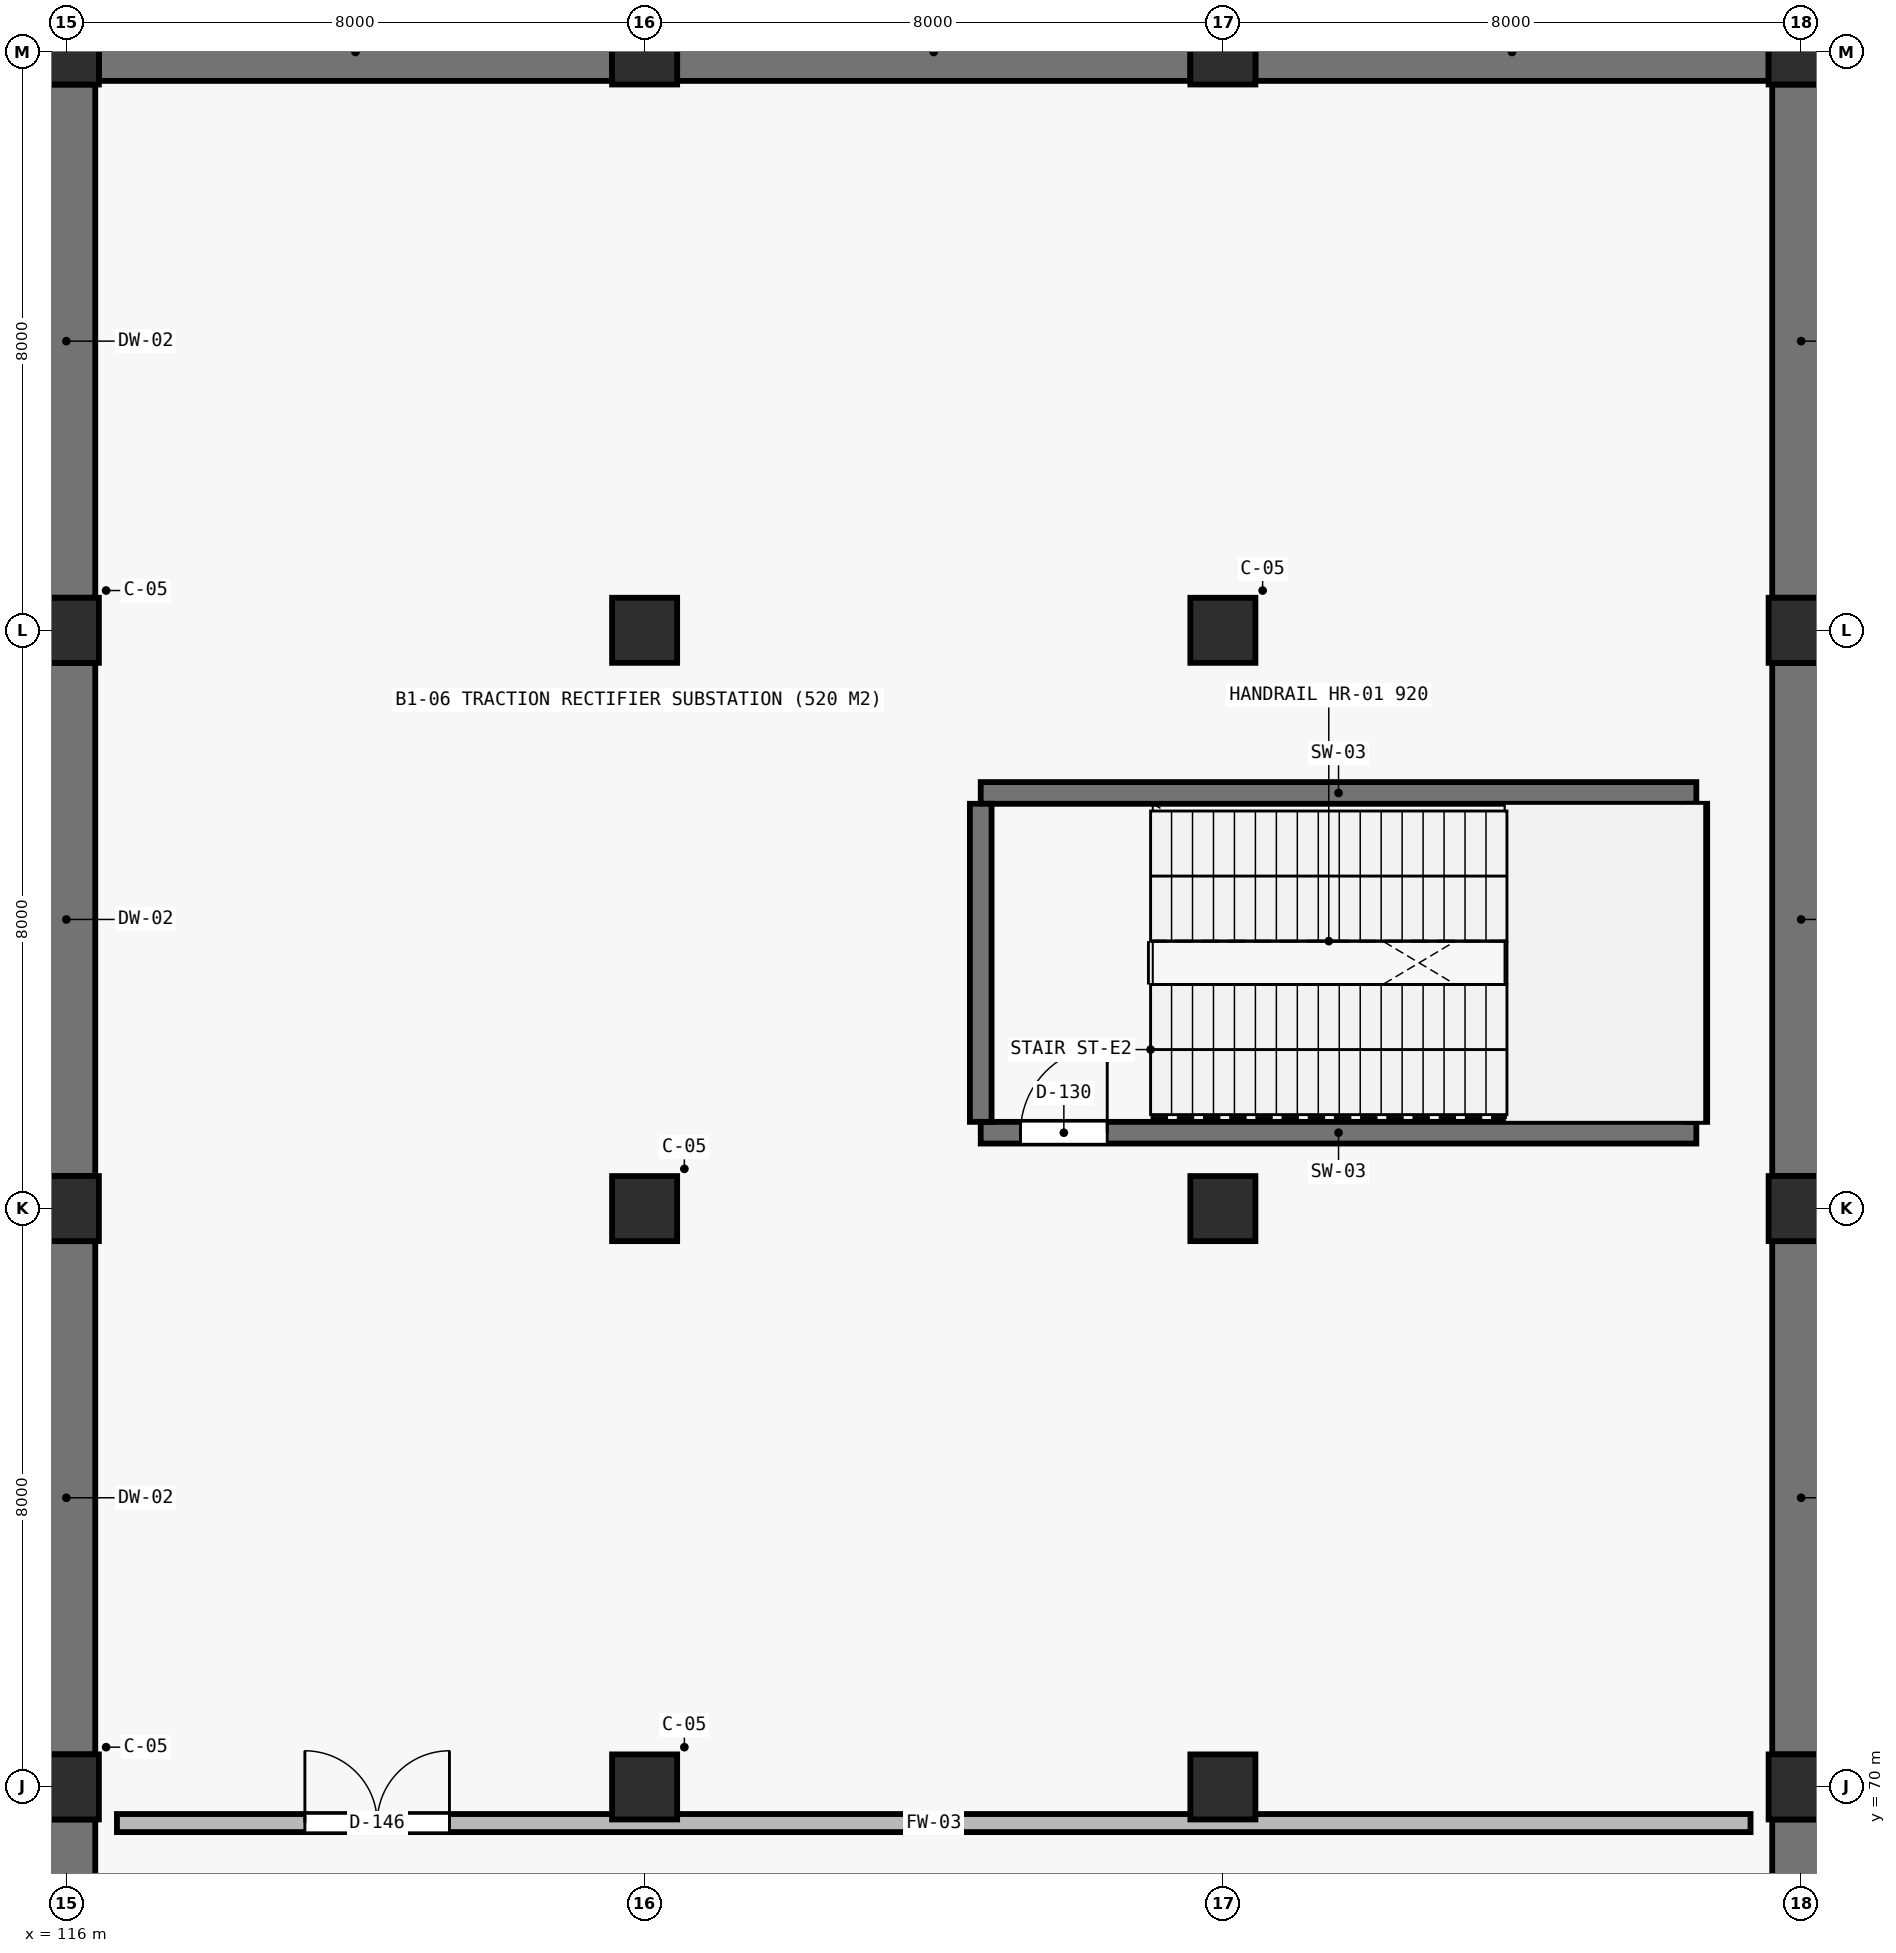
"""IFC4 building model, lengths in metres.
Left out: names, types, materials, properties, quantities, classifications, styles, units other than length and angle.
Written with IfcOpenShell. Run it as: python <this file> out.ifc"""

import sys

from ifc_helpers import new_model, si_unit, direction, frame, frame_2d, origin, origin_2d, place, context, subcontext, project, spatial, rectangle, extrude, element, fill, save


model = new_model("IFC4")
c1 = context("Model", 3, precision=1e-05, world=origin(), true_north=direction((0.0, 1.0)))
c2 = subcontext(c1, "Body", "Model", "MODEL_VIEW")
j1 = project(units=[si_unit("LENGTHUNIT", "METRE"), si_unit("PLANEANGLEUNIT", "RADIAN")], contexts=[c1])
p1 = place(None, origin())
s1 = spatial("IfcSite", under=j1, at=p1, CompositionType="ELEMENT")
p2 = place(p1, origin())
s2 = spatial("IfcBuilding", under=s1, at=p2, CompositionType="ELEMENT")
p3 = place(p2, frame((0.0, 0.0, -6.3)))
s3 = spatial("IfcBuildingStorey", under=s2, at=p3, CompositionType="ELEMENT", Elevation=-6.3)
for number, where, z_axis, x_axis in (
    (1, (116.0, 70.0, 0.0), (0.0, 0.0, 1.0), (1.0, 0.0, 0.0)),
    (2, (116.0, 78.0, 0.0), (0.0, 0.0, 1.0), (1.0, 0.0, 0.0)),
    (3, (116.0, 86.0, 0.0), (0.0, 0.0, 1.0), (1.0, 0.0, 0.0)),
    (4, (116.0, 94.0, 0.0), (0.0, 0.0, 1.0), (1.0, 0.0, 0.0)),
    (5, (124.0, 70.0, 0.0), (0.0, 0.0, 1.0), (1.0, 0.0, 0.0)),
    (6, (124.0, 78.0, 0.0), (0.0, 0.0, 1.0), (1.0, 0.0, 0.0)),
    (7, (124.0, 86.0, 0.0), (0.0, 0.0, 1.0), (1.0, 0.0, 0.0)),
    (8, (124.0, 94.0, 0.0), (0.0, 0.0, 1.0), (1.0, 0.0, 0.0)),
    (9, (132.0, 70.0, 0.0), (0.0, 0.0, 1.0), (1.0, 0.0, 0.0)),
    (10, (132.0, 78.0, 0.0), (0.0, 0.0, 1.0), (1.0, 0.0, 0.0)),
    (11, (132.0, 86.0, 0.0), (0.0, 0.0, 1.0), (1.0, 0.0, 0.0)),
    (12, (132.0, 94.0, 0.0), (0.0, 0.0, 1.0), (1.0, 0.0, 0.0)),
    (13, (140.0, 70.0, 0.0), (0.0, 0.0, 1.0), (1.0, 0.0, 0.0)),
    (14, (140.0, 78.0, 0.0), (0.0, 0.0, 1.0), (1.0, 0.0, 0.0)),
    (15, (140.0, 86.0, 0.0), (0.0, 0.0, 1.0), (1.0, 0.0, 0.0)),
    (16, (140.0, 94.0, 0.0), (0.0, 0.0, 1.0), (1.0, 0.0, 0.0)),
):
    element("IfcColumn", number, at=place(p3, frame(where, z_axis=z_axis, x_axis=x_axis)), inside=s3, PredefinedType="COLUMN", context=c2, shape_type="SweptSolid", body=[
        extrude(rectangle(XDim=0.9, YDim=0.9, at=origin_2d()), origin(), (0.0, 0.0, 1.0), 5.85),
    ])
for number, where, z_axis, x_axis in (
    (17, (140.0, 62.45, 0.0), (0.0, 0.0, 1.0), (0.0, 1.0, 0.0)),
    (18, (140.0, 70.45, 0.0), (0.0, 0.0, 1.0), (0.0, 1.0, 0.0)),
    (19, (140.0, 78.45, 0.0), (0.0, 0.0, 1.0), (0.0, 1.0, 0.0)),
    (20, (140.0, 86.45, 0.0), (0.0, 0.0, 1.0), (0.0, 1.0, 0.0)),
    (21, (139.55, 94.0, 0.0), (0.0, 0.0, 1.0), (-1.0, 0.0, 0.0)),
    (22, (131.55, 94.0, 0.0), (0.0, 0.0, 1.0), (-1.0, 0.0, 0.0)),
    (23, (123.55, 94.0, 0.0), (0.0, 0.0, 1.0), (-1.0, 0.0, 0.0)),
    (24, (116.0, 93.55, 0.0), (0.0, 0.0, 1.0), (0.0, -1.0, 0.0)),
    (25, (116.0, 85.55, 0.0), (0.0, 0.0, 1.0), (0.0, -1.0, 0.0)),
    (26, (116.0, 77.55, 0.0), (0.0, 0.0, 1.0), (0.0, -1.0, 0.0)),
):
    element("IfcWall", number, at=place(p3, frame(where, z_axis=z_axis, x_axis=x_axis)), inside=s3, PredefinedType="USERDEFINED", context=c2, shape_type="SweptSolid", body=[
        extrude(rectangle(XDim=7.1, YDim=0.8, at=frame_2d((3.55, 0.0))), origin(), (0.0, 0.0, 1.0), 5.85),
    ])
p4 = place(p3, frame((116.0, 69.55, 0.0), z_axis=(0.0, 0.0, 1.0), x_axis=(0.0, -1.0, 0.0)))
e27 = element("IfcWall", 27, at=p4, inside=s3, PredefinedType="USERDEFINED", context=c2, shape_type="SweptSolid", body=[
    extrude(rectangle(XDim=6.95, YDim=0.8, at=frame_2d((3.475, 0.0))), origin(), (0.0, 0.0, 1.0), 5.85),
])
p5 = place(p3, frame((128.65, 83.75, 0.0), z_axis=(0.0, 0.0, 1.0), x_axis=(1.0, 0.0, 0.0)))
e28 = element("IfcWall", 28, at=p5, inside=s3, PredefinedType="SHEAR", context=c2, shape_type="SweptSolid", body=[
    extrude(rectangle(XDim=9.9, YDim=0.3, at=frame_2d((4.95, 0.0))), origin(), (0.0, 0.0, 1.0), 5.85),
])
p6 = place(p3, frame((128.65, 79.05, 0.0), z_axis=(0.0, 0.0, 1.0), x_axis=(1.0, 0.0, 0.0)))
e29 = element("IfcWall", 29, at=p6, inside=s3, PredefinedType="SHEAR", context=c2, shape_type="SweptSolid", body=[
    extrude(rectangle(XDim=9.9, YDim=0.3, at=frame_2d((4.95, 0.0))), origin(), (0.0, 0.0, 1.0), 5.85),
])
p7 = place(p6, frame((0.55, 0.0, 0.0)))
e30 = element("IfcOpeningElement", 30, at=p7, cuts=e29, PredefinedType="OPENING", context=c2, shape_type="SweptSolid", body=[
    extrude(rectangle(XDim=1.2, YDim=2.2, at=frame_2d((0.6, 1.1))), frame((0.0, 0.16, 0.0), z_axis=(0.0, -1.0, 0.0), x_axis=(1.0, 0.0, 0.0)), (0.0, 0.0, 1.0), 0.32),
])
for number, where, z_axis, x_axis in (
    (31, (128.65, 79.2, 0.0), (0.0, 0.0, 1.0), (0.0, 1.0, 0.0)),
    (32, (138.55, 79.2, 0.0), (0.0, 0.0, 1.0), (0.0, 1.0, 0.0)),
):
    element("IfcWall", number, at=place(p3, frame(where, z_axis=z_axis, x_axis=x_axis)), inside=s3, PredefinedType="SHEAR", context=c2, shape_type="SweptSolid", body=[
        extrude(rectangle(XDim=4.4, YDim=0.3, at=frame_2d((2.2, 0.0))), origin(), (0.0, 0.0, 1.0), 5.85),
    ])
p8 = place(p3, frame((116.7, 69.5, 0.0), z_axis=(0.0, 0.0, 1.0), x_axis=(1.0, 0.0, 0.0)))
e33 = element("IfcWall", 33, at=p8, inside=s3, PredefinedType="SOLIDWALL", context=c2, shape_type="SweptSolid", body=[
    extrude(rectangle(XDim=22.6, YDim=0.25, at=frame_2d((11.3, 0.0))), origin(), (0.0, 0.0, 1.0), 5.85),
])
p9 = place(p8, frame((2.6, 0.0, 0.0)))
e34 = element("IfcOpeningElement", 34, at=p9, cuts=e33, PredefinedType="OPENING", context=c2, shape_type="SweptSolid", body=[
    extrude(rectangle(XDim=2.0, YDim=2.3, at=frame_2d((1.0, 1.15))), frame((0.0, 0.135, 0.0), z_axis=(0.0, -1.0, 0.0), x_axis=(1.0, 0.0, 0.0)), (0.0, 0.0, 1.0), 0.27),
])
p10 = place(p7, origin())
e35 = element("IfcDoor", 35, at=p10, inside=s3, OperationType="SINGLE_SWING_RIGHT", PredefinedType="DOOR", context=c2, shape_type="SweptSolid", body=[
    extrude(rectangle(XDim=1.2, YDim=2.2, at=frame_2d((0.6, 1.1))), frame((0.0, 0.025, 0.0), z_axis=(0.0, -1.0, 0.0), x_axis=(1.0, 0.0, 0.0)), (0.0, 0.0, 1.0), 0.05),
])
fill(e30, e35)
p11 = place(p9, origin())
e36 = element("IfcDoor", 36, at=p11, inside=s3, OperationType="DOUBLE_DOOR_SINGLE_SWING", PredefinedType="DOOR", context=c2, shape_type="SweptSolid", body=[
    extrude(rectangle(XDim=2.0, YDim=2.3, at=frame_2d((1.0, 1.15))), frame((0.0, 0.025, 0.0), z_axis=(0.0, -1.0, 0.0), x_axis=(1.0, 0.0, 0.0)), (0.0, 0.0, 1.0), 0.05),
])
fill(e34, e36)
save(model, sys.argv[1])
